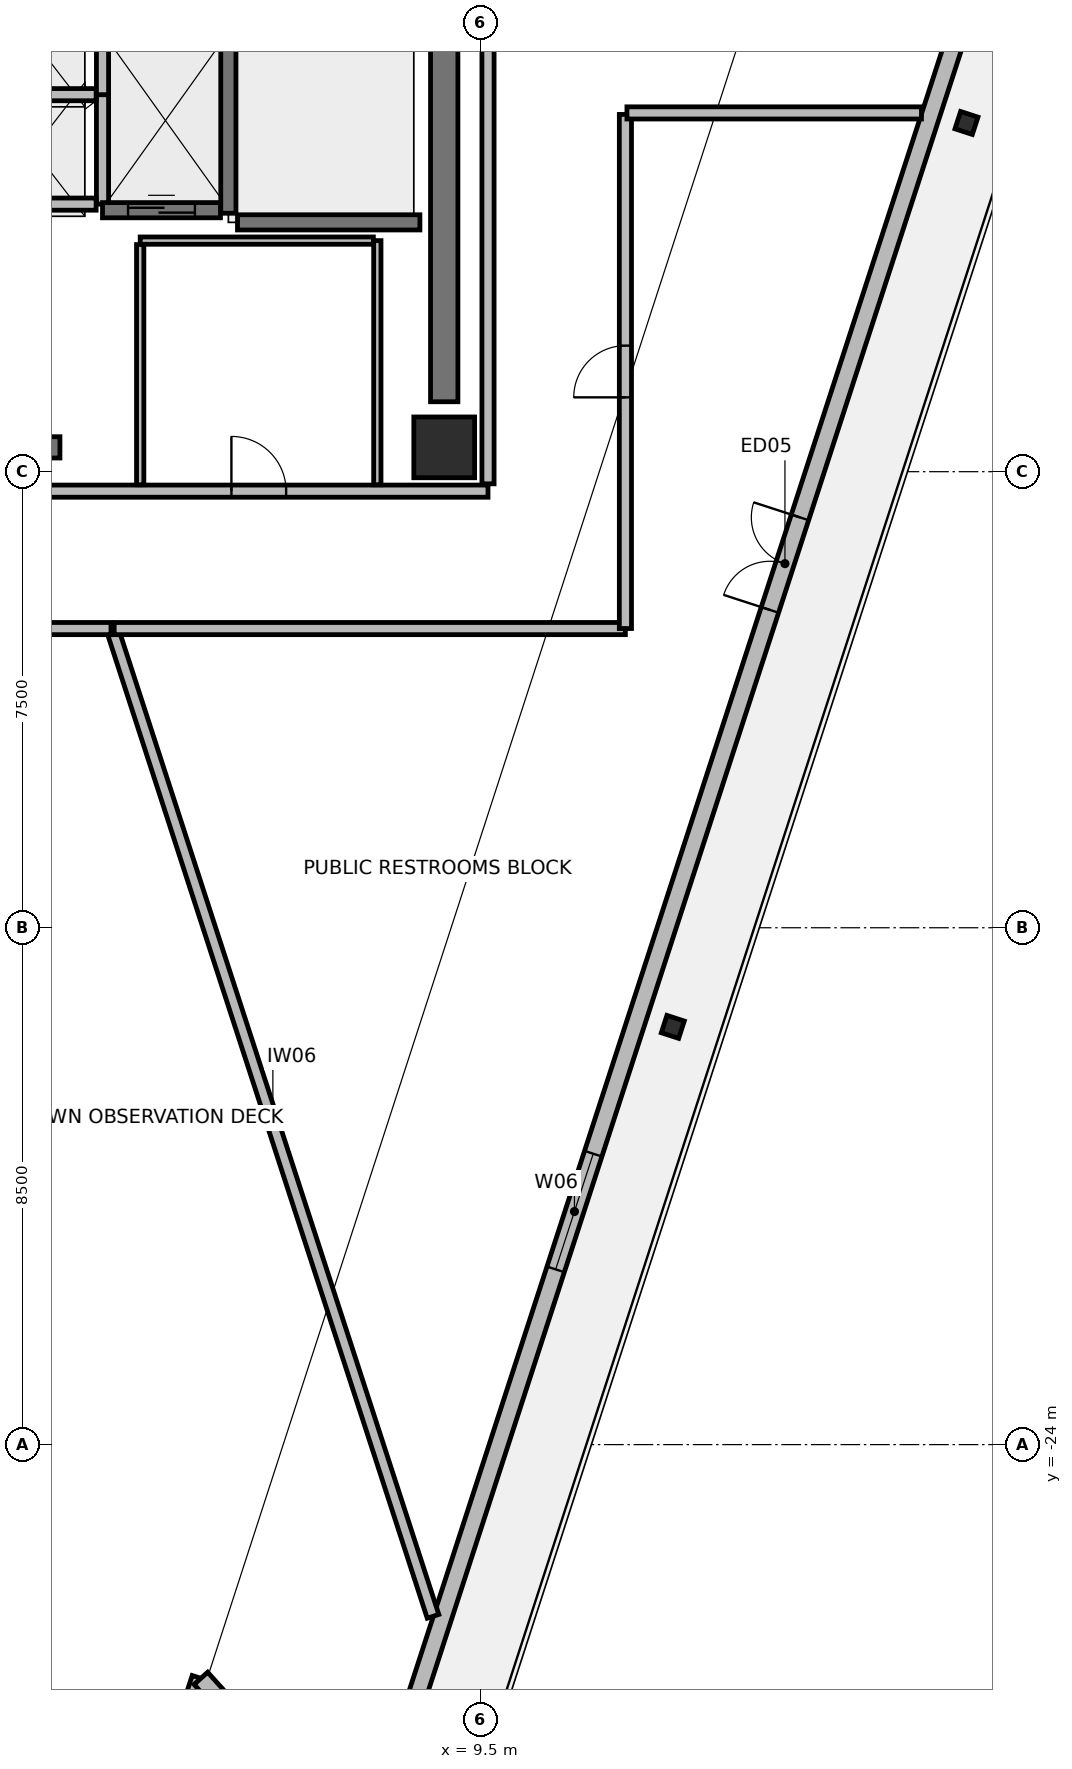
"""IFC4 building model, lengths in metres.
Left out: names, types, materials, properties, quantities, classifications, styles, units other than length and angle.
Written with IfcOpenShell. Run it as: python <this file> out.ifc"""

import sys

from ifc_helpers import new_model, si_unit, direction, frame, frame_2d, origin, origin_2d, place, context, subcontext, project, spatial, rectangle, hollow_rectangle, extrude, element, fill, save


model = new_model("IFC4")
c1 = context("Model", 3, precision=1e-05, world=origin(), true_north=direction((0.0, 1.0)))
c2 = subcontext(c1, "Body", "Model", "MODEL_VIEW")
j1 = project(units=[si_unit("LENGTHUNIT", "METRE"), si_unit("PLANEANGLEUNIT", "RADIAN")], contexts=[c1])
p1 = place(None, origin())
s1 = spatial("IfcSite", under=j1, at=p1, CompositionType="ELEMENT")
p2 = place(p1, origin())
s2 = spatial("IfcBuilding", under=s1, at=p2, CompositionType="ELEMENT")
p3 = place(p2, frame((0.0, 0.0, 306.3)))
s3 = spatial("IfcBuildingStorey", under=s2, at=p3, CompositionType="ELEMENT", Elevation=306.3)
p4 = place(p3, frame((8.9, -7.6, 0.0), z_axis=(0.0, 0.0, 1.0), x_axis=(1.0, 0.0, 0.0)))
e1 = element("IfcColumn", 1, at=p4, inside=s3, PredefinedType="COLUMN", context=c2, shape_type="SweptSolid", body=[
    extrude(rectangle(XDim=1.0, YDim=1.0, at=origin_2d()), origin(), (0.0, 0.0, 1.0), 4.55),
])
for number, where, z_axis, x_axis in (
    (2, (12.659, -17.131, 0.0), (0.0, 0.0, 1.0), (0.309, 0.951, 0.0)),
    (3, (17.489, -2.265, 0.0), (0.0, 0.0, 1.0), (0.309, 0.951, 0.0)),
):
    element("IfcColumn", number, at=place(p3, frame(where, z_axis=z_axis, x_axis=x_axis)), inside=s3, PredefinedType="COLUMN", context=c2, shape_type="SweptSolid", body=[
        extrude(hollow_rectangle(XDim=0.3, YDim=0.3, WallThickness=0.02, at=origin_2d()), origin(), (0.0, 0.0, 1.0), 4.55),
    ])
p5 = place(p3, frame((-24.537, -0.339, 0.0), z_axis=(0.0, 0.0, 1.0), x_axis=(0.669127961041, -0.743147207324, 0.0)))
e4 = element("IfcWall", 4, at=p5, inside=s3, PredefinedType="STANDARD", context=c2, shape_type="SweptSolid", body=[
    extrude(rectangle(XDim=42.14, YDim=0.3, at=frame_2d((21.07, 0.0))), origin(), (0.0, 0.0, 1.0), 3.805),
])
p6 = place(p5, frame((20.27, 0.0, 0.0)))
e5 = element("IfcOpeningElement", 5, at=p6, cuts=e4, PredefinedType="OPENING", context=c2, shape_type="SweptSolid", body=[
    extrude(rectangle(XDim=1.6, YDim=2.3, at=frame_2d((0.8, 1.15))), frame((0.0, 0.16, 0.0), z_axis=(0.0, -1.0, 0.0), x_axis=(1.0, 0.0, 0.0)), (0.0, 0.0, 1.0), 0.32),
])
p7 = place(p5, frame((9.535, 0.0, 0.85)))
e6 = element("IfcOpeningElement", 6, at=p7, cuts=e4, PredefinedType="OPENING", context=c2, shape_type="SweptSolid", body=[
    extrude(rectangle(XDim=2.0, YDim=2.4, at=frame_2d((1.0, 1.2))), frame((0.0, 0.16, 0.0), z_axis=(0.0, -1.0, 0.0), x_axis=(1.0, 0.0, 0.0)), (0.0, 0.0, 1.0), 0.32),
])
p8 = place(p5, frame((30.605, 0.0, 0.85)))
e7 = element("IfcOpeningElement", 7, at=p8, cuts=e4, PredefinedType="OPENING", context=c2, shape_type="SweptSolid", body=[
    extrude(rectangle(XDim=2.0, YDim=2.4, at=frame_2d((1.0, 1.2))), frame((0.0, 0.16, 0.0), z_axis=(0.0, -1.0, 0.0), x_axis=(1.0, 0.0, 0.0)), (0.0, 0.0, 1.0), 0.32),
])
p9 = place(p3, frame((3.659, -31.655, 0.0), z_axis=(0.0, 0.0, 1.0), x_axis=(0.309018580232, 0.951056001018, 0.0)))
e8 = element("IfcWall", 8, at=p9, inside=s3, PredefinedType="STANDARD", context=c2, shape_type="SweptSolid", body=[
    extrude(rectangle(XDim=4.008, YDim=0.3, at=frame_2d((2.004, 0.0))), origin(), (0.0, 0.0, 1.0), 3.805),
])
p10 = place(p9, frame((1.004, 0.0, 0.85)))
e9 = element("IfcOpeningElement", 9, at=p10, cuts=e8, PredefinedType="OPENING", context=c2, shape_type="SweptSolid", body=[
    extrude(rectangle(XDim=2.0, YDim=2.4, at=frame_2d((1.0, 1.2))), frame((0.0, 0.16, 0.0), z_axis=(0.0, -1.0, 0.0), x_axis=(1.0, 0.0, 0.0)), (0.0, 0.0, 1.0), 0.32),
])
p11 = place(p3, frame((4.898, -27.843, 0.0), z_axis=(0.0, 0.0, 1.0), x_axis=(0.669132983361, -0.743142685208, 0.0)))
e10 = element("IfcWall", 10, at=p11, inside=s3, PredefinedType="STANDARD", context=c2, shape_type="SweptSolid", body=[
    extrude(rectangle(XDim=4.008, YDim=0.3, at=frame_2d((2.004, 0.0))), origin(), (0.0, 0.0, 1.0), 3.805),
])
p12 = place(p11, frame((1.004, 0.0, 0.85)))
e11 = element("IfcOpeningElement", 11, at=p12, cuts=e10, PredefinedType="OPENING", context=c2, shape_type="SweptSolid", body=[
    extrude(rectangle(XDim=2.0, YDim=2.4, at=frame_2d((1.0, 1.2))), frame((0.0, 0.16, 0.0), z_axis=(0.0, -1.0, 0.0), x_axis=(1.0, 0.0, 0.0)), (0.0, 0.0, 1.0), 0.32),
])
p13 = place(p3, frame((7.58, -30.822, 0.0), z_axis=(0.0, 0.0, 1.0), x_axis=(0.309018932156, 0.95105588667, 0.0)))
e12 = element("IfcWall", 12, at=p13, inside=s3, PredefinedType="STANDARD", context=c2, shape_type="SweptSolid", body=[
    extrude(rectangle(XDim=44.812, YDim=0.3, at=frame_2d((22.406, 0.0))), origin(), (0.0, 0.0, 1.0), 3.805),
])
p14 = place(p13, frame((21.606, 0.0, 0.0)))
e13 = element("IfcOpeningElement", 13, at=p14, cuts=e12, PredefinedType="OPENING", context=c2, shape_type="SweptSolid", body=[
    extrude(rectangle(XDim=1.6, YDim=2.3, at=frame_2d((0.8, 1.15))), frame((0.0, 0.16, 0.0), z_axis=(0.0, -1.0, 0.0), x_axis=(1.0, 0.0, 0.0)), (0.0, 0.0, 1.0), 0.32),
])
p15 = place(p13, frame((10.203, 0.0, 0.85)))
e14 = element("IfcOpeningElement", 14, at=p15, cuts=e12, PredefinedType="OPENING", context=c2, shape_type="SweptSolid", body=[
    extrude(rectangle(XDim=2.0, YDim=2.4, at=frame_2d((1.0, 1.2))), frame((0.0, 0.16, 0.0), z_axis=(0.0, -1.0, 0.0), x_axis=(1.0, 0.0, 0.0)), (0.0, 0.0, 1.0), 0.32),
])
p16 = place(p13, frame((32.609, 0.0, 0.85)))
e15 = element("IfcOpeningElement", 15, at=p16, cuts=e12, PredefinedType="OPENING", context=c2, shape_type="SweptSolid", body=[
    extrude(rectangle(XDim=2.0, YDim=2.4, at=frame_2d((1.0, 1.2))), frame((0.0, 0.16, 0.0), z_axis=(0.0, -1.0, 0.0), x_axis=(1.0, 0.0, 0.0)), (0.0, 0.0, 1.0), 0.32),
])
p17 = place(p3, frame((-2.8, -7.6, 0.0), z_axis=(0.0, 0.0, 1.0), x_axis=(1.0, 0.0, 0.0)))
e16 = element("IfcWall", 16, at=p17, inside=s3, PredefinedType="SHEAR", context=c2, shape_type="SweptSolid", body=[
    extrude(rectangle(XDim=5.38, YDim=0.35, at=frame_2d((2.69, 0.0))), origin(), (0.0, 0.0, 1.0), 4.31),
])
p18 = place(p3, frame((8.9, -6.85, 0.0), z_axis=(0.0, 0.0, 1.0), x_axis=(0.0, 1.0, 0.0)))
e17 = element("IfcWall", 17, at=p18, inside=s3, PredefinedType="SHEAR", context=c2, shape_type="SweptSolid", body=[
    extrude(rectangle(XDim=10.7, YDim=0.45, at=frame_2d((5.35, 0.0))), origin(), (0.0, 0.0, 1.0), 4.31),
])
p19 = place(p3, frame((-9.62, -8.32, 0.0), z_axis=(0.0, 0.0, 1.0), x_axis=(1.0, 0.0, 0.0)))
e18 = element("IfcWall", 18, at=p19, inside=s3, PredefinedType="PARTITIONING", context=c2, shape_type="SweptSolid", body=[
    extrude(rectangle(XDim=19.24, YDim=0.2, at=frame_2d((9.62, 0.0))), origin(), (0.0, 0.0, 1.0), 3.805),
])
p20 = place(p19, frame((8.57, 0.0, 0.0)))
e19 = element("IfcOpeningElement", 19, at=p20, cuts=e18, PredefinedType="OPENING", context=c2, shape_type="SweptSolid", body=[
    extrude(rectangle(XDim=0.9, YDim=2.1, at=frame_2d((0.45, 1.05))), frame((0.0, 0.11, 0.0), z_axis=(0.0, -1.0, 0.0), x_axis=(1.0, 0.0, 0.0)), (0.0, 0.0, 1.0), 0.22),
])
p21 = place(p19, frame((15.02, 0.0, 0.0)))
e20 = element("IfcOpeningElement", 20, at=p21, cuts=e18, PredefinedType="OPENING", context=c2, shape_type="SweptSolid", body=[
    extrude(rectangle(XDim=0.9, YDim=2.1, at=frame_2d((0.45, 1.05))), frame((0.0, 0.11, 0.0), z_axis=(0.0, -1.0, 0.0), x_axis=(1.0, 0.0, 0.0)), (0.0, 0.0, 1.0), 0.22),
])
p22 = place(p3, frame((9.62, -8.2, 0.0), z_axis=(0.0, 0.0, 1.0), x_axis=(0.0, 1.0, 0.0)))
e21 = element("IfcWall", 21, at=p22, inside=s3, PredefinedType="PARTITIONING", context=c2, shape_type="SweptSolid", body=[
    extrude(rectangle(XDim=16.4, YDim=0.2, at=frame_2d((8.2, 0.0))), origin(), (0.0, 0.0, 1.0), 3.805),
])
p23 = place(p22, frame((12.65, 0.0, 0.0)))
e22 = element("IfcOpeningElement", 22, at=p23, cuts=e21, PredefinedType="OPENING", context=c2, shape_type="SweptSolid", body=[
    extrude(rectangle(XDim=1.1, YDim=2.15, at=frame_2d((0.55, 1.075))), frame((0.0, 0.11, 0.0), z_axis=(0.0, -1.0, 0.0), x_axis=(1.0, 0.0, 0.0)), (0.0, 0.0, 1.0), 0.22),
])
p24 = place(p3, frame((5.35, -3.75, 0.0), z_axis=(0.0, 0.0, 1.0), x_axis=(0.0, 1.0, 0.0)))
e23 = element("IfcWall", 23, at=p24, inside=s3, PredefinedType="SHEAR", context=c2, shape_type="SweptSolid", body=[
    extrude(rectangle(XDim=7.3, YDim=0.25, at=frame_2d((3.65, 0.0))), origin(), (0.0, 0.0, 1.0), 4.31),
])
p25 = place(p3, frame((5.5, -3.9, 0.0), z_axis=(0.0, 0.0, 1.0), x_axis=(1.0, 0.0, 0.0)))
e24 = element("IfcWall", 24, at=p25, inside=s3, PredefinedType="SHEAR", context=c2, shape_type="SweptSolid", body=[
    extrude(rectangle(XDim=3.0, YDim=0.25, at=frame_2d((1.5, 0.0))), origin(), (0.0, 0.0, 1.0), 4.31),
])
p26 = place(p3, frame((3.28, -3.6, 0.0), z_axis=(0.0, 0.0, 1.0), x_axis=(0.0, 1.0, 0.0)))
e25 = element("IfcWall", 25, at=p26, inside=s3, PredefinedType="PARTITIONING", context=c2, shape_type="SweptSolid", body=[
    extrude(rectangle(XDim=1.8, YDim=0.2, at=frame_2d((0.9, 0.0))), origin(), (0.0, 0.0, 1.0), 4.31),
])
for number, where, z_axis, x_axis in (
    (26, (1.13, -3.6, 0.0), (0.0, 0.0, 1.0), (1.0, 0.0, 0.0)),
    (27, (1.13, -1.8, 0.0), (0.0, 0.0, 1.0), (1.0, 0.0, 0.0)),
):
    element("IfcWall", number, at=place(p3, frame(where, z_axis=z_axis, x_axis=x_axis)), inside=s3, PredefinedType="PARTITIONING", context=c2, shape_type="SweptSolid", body=[
        extrude(rectangle(XDim=2.045, YDim=0.2, at=frame_2d((1.022, 0.0))), origin(), (0.0, 0.0, 1.0), 4.31),
    ])
p27 = place(p3, frame((3.28, -1.8, 0.0), z_axis=(0.0, 0.0, 1.0), x_axis=(0.0, 1.0, 0.0)))
e28 = element("IfcWall", 28, at=p27, inside=s3, PredefinedType="PARTITIONING", context=c2, shape_type="SweptSolid", body=[
    extrude(rectangle(XDim=1.8, YDim=0.2, at=frame_2d((0.9, 0.0))), origin(), (0.0, 0.0, 1.0), 4.31),
])
p28 = place(p3, frame((3.28, -3.7, 0.0), z_axis=(0.0, 0.0, 1.0), x_axis=(1.0, 0.0, 0.0)))
e29 = element("IfcWall", 29, at=p28, inside=s3, PredefinedType="SHEAR", context=c2, shape_type="SweptSolid", body=[
    extrude(rectangle(XDim=1.94, YDim=0.25, at=frame_2d((0.97, 0.0))), origin(), (0.0, 0.0, 1.0), 4.31),
])
p29 = place(p28, frame((0.42, 0.0, 0.0)))
e30 = element("IfcOpeningElement", 30, at=p29, cuts=e29, PredefinedType="OPENING", context=c2, shape_type="SweptSolid", body=[
    extrude(rectangle(XDim=1.1, YDim=2.2, at=frame_2d((0.55, 1.1))), frame((0.0, 0.135, 0.0), z_axis=(0.0, -1.0, 0.0), x_axis=(1.0, 0.0, 0.0)), (0.0, 0.0, 1.0), 0.27),
])
p30 = place(p3, frame((7.8, -8.215, 0.0), z_axis=(0.0, 0.0, 1.0), x_axis=(0.0, 1.0, 0.0)))
e31 = element("IfcWall", 31, at=p30, inside=s3, PredefinedType="PARTITIONING", context=c2, shape_type="SweptSolid", body=[
    extrude(rectangle(XDim=4.015, YDim=0.12, at=frame_2d((2.008, 0.0))), origin(), (0.0, 0.0, 1.0), 3.605),
])
p31 = place(p3, frame((7.735, -4.2, 0.0), z_axis=(0.0, 0.0, 1.0), x_axis=(-1.0, 0.0, 0.0)))
e32 = element("IfcWall", 32, at=p31, inside=s3, PredefinedType="PARTITIONING", context=c2, shape_type="SweptSolid", body=[
    extrude(rectangle(XDim=3.835, YDim=0.12, at=frame_2d((1.917, 0.0))), origin(), (0.0, 0.0, 1.0), 4.31),
])
p32 = place(p3, frame((3.9, -4.265, 0.0), z_axis=(0.0, 0.0, 1.0), x_axis=(0.0, -1.0, 0.0)))
e33 = element("IfcWall", 33, at=p32, inside=s3, PredefinedType="PARTITIONING", context=c2, shape_type="SweptSolid", body=[
    extrude(rectangle(XDim=3.95, YDim=0.12, at=frame_2d((1.975, 0.0))), origin(), (0.0, 0.0, 1.0), 3.605),
])
p33 = place(p3, frame((8.716, -26.824, 0.0), z_axis=(0.0, 0.0, 1.0), x_axis=(-0.309025833938, 0.951053644102, 0.0)))
e34 = element("IfcWall", 34, at=p33, inside=s3, PredefinedType="PARTITIONING", context=c2, shape_type="SweptSolid", body=[
    extrude(rectangle(XDim=17.046, YDim=0.2, at=frame_2d((8.523, 0.0))), origin(), (0.0, 0.0, 1.0), 3.805),
])
p34 = place(p3, frame((3.472, -10.58, 0.0), z_axis=(0.0, 0.0, 1.0), x_axis=(1.0, 0.0, 0.0)))
e35 = element("IfcWall", 35, at=p34, inside=s3, PredefinedType="PARTITIONING", context=c2, shape_type="SweptSolid", body=[
    extrude(rectangle(XDim=8.407, YDim=0.2, at=frame_2d((4.204, 0.0))), origin(), (0.0, 0.0, 1.0), 3.805),
])
p35 = place(p3, frame((11.88, -10.579, 0.0), z_axis=(0.0, 0.0, 1.0), x_axis=(0.0, 1.0, 0.0)))
e36 = element("IfcWall", 36, at=p35, inside=s3, PredefinedType="PARTITIONING", context=c2, shape_type="SweptSolid", body=[
    extrude(rectangle(XDim=8.454, YDim=0.2, at=frame_2d((4.227, 0.0))), origin(), (0.0, 0.0, 1.0), 3.805),
])
p36 = place(p35, frame((3.802, 0.0, 0.0)))
e37 = element("IfcOpeningElement", 37, at=p36, cuts=e36, PredefinedType="OPENING", context=c2, shape_type="SweptSolid", body=[
    extrude(rectangle(XDim=0.85, YDim=2.1, at=frame_2d((0.425, 1.05))), frame((0.0, 0.11, 0.0), z_axis=(0.0, -1.0, 0.0), x_axis=(1.0, 0.0, 0.0)), (0.0, 0.0, 1.0), 0.22),
])
p37 = place(p3, frame((11.905, -2.1, 0.0), z_axis=(0.0, 0.0, 1.0), x_axis=(1.0, 0.0, 0.0)))
e38 = element("IfcWall", 38, at=p37, inside=s3, PredefinedType="PARTITIONING", context=c2, shape_type="SweptSolid", body=[
    extrude(rectangle(XDim=4.844, YDim=0.2, at=frame_2d((2.422, 0.0))), origin(), (0.0, 0.0, 1.0), 4.065),
])
p38 = place(p3, frame((-11.879, -10.58, 0.0), z_axis=(0.0, 0.0, 1.0), x_axis=(1.0, 0.0, 0.0)))
e39 = element("IfcWall", 39, at=p38, inside=s3, PredefinedType="PARTITIONING", context=c2, shape_type="SweptSolid", body=[
    extrude(rectangle(XDim=15.299, YDim=0.2, at=frame_2d((7.649, 0.0))), origin(), (0.0, 0.0, 1.0), 3.805),
])
p39 = place(p38, frame((6.849, 0.0, 0.0)))
e40 = element("IfcOpeningElement", 40, at=p39, cuts=e39, PredefinedType="OPENING", context=c2, shape_type="SweptSolid", body=[
    extrude(rectangle(XDim=1.6, YDim=2.2, at=frame_2d((0.8, 1.1))), frame((0.0, 0.11, 0.0), z_axis=(0.0, -1.0, 0.0), x_axis=(1.0, 0.0, 0.0)), (0.0, 0.0, 1.0), 0.22),
])
p40 = place(p14, frame((1.6, 0.0, 0.0), z_axis=(0.0, 0.0, 1.0), x_axis=(-1.0, 0.0, 0.0)))
e41 = element("IfcDoor", 41, at=p40, inside=s3, OperationType="DOUBLE_DOOR_SINGLE_SWING", PredefinedType="DOOR", context=c2, shape_type="SweptSolid", body=[
    extrude(rectangle(XDim=1.6, YDim=2.3, at=frame_2d((0.8, 1.15))), frame((0.0, 0.025, 0.0), z_axis=(0.0, -1.0, 0.0), x_axis=(1.0, 0.0, 0.0)), (0.0, 0.0, 1.0), 0.05),
])
fill(e13, e41)
p41 = place(p15, origin())
e42 = element("IfcWindow", 42, at=p41, inside=s3, PartitioningType="SINGLE_PANEL", PredefinedType="WINDOW", context=c2, shape_type="SweptSolid", body=[
    extrude(rectangle(XDim=2.0, YDim=2.4, at=frame_2d((1.0, 1.2))), frame((0.0, 0.03, 0.0), z_axis=(0.0, -1.0, 0.0), x_axis=(1.0, 0.0, 0.0)), (0.0, 0.0, 1.0), 0.06),
])
fill(e14, e42)
p42 = place(p29, origin())
e43 = element("IfcDoor", 43, at=p42, inside=s3, OperationType="SLIDING_TO_LEFT", PredefinedType="DOOR", context=c2, shape_type="SweptSolid", body=[
    extrude(rectangle(XDim=1.1, YDim=2.2, at=frame_2d((0.55, 1.1))), frame((0.0, 0.025, 0.0), z_axis=(0.0, -1.0, 0.0), x_axis=(1.0, 0.0, 0.0)), (0.0, 0.0, 1.0), 0.05),
])
fill(e30, e43)
p43 = place(p21, origin())
e44 = element("IfcDoor", 44, at=p43, inside=s3, OperationType="SINGLE_SWING_LEFT", PredefinedType="DOOR", context=c2, shape_type="SweptSolid", body=[
    extrude(rectangle(XDim=0.9, YDim=2.1, at=frame_2d((0.45, 1.05))), frame((0.0, 0.025, 0.0), z_axis=(0.0, -1.0, 0.0), x_axis=(1.0, 0.0, 0.0)), (0.0, 0.0, 1.0), 0.05),
])
fill(e20, e44)
p44 = place(p36, origin())
e45 = element("IfcDoor", 45, at=p44, inside=s3, OperationType="SINGLE_SWING_RIGHT", PredefinedType="DOOR", context=c2, shape_type="SweptSolid", body=[
    extrude(rectangle(XDim=0.85, YDim=2.1, at=frame_2d((0.425, 1.05))), frame((0.0, 0.025, 0.0), z_axis=(0.0, -1.0, 0.0), x_axis=(1.0, 0.0, 0.0)), (0.0, 0.0, 1.0), 0.05),
])
fill(e37, e45)
save(model, sys.argv[1])
